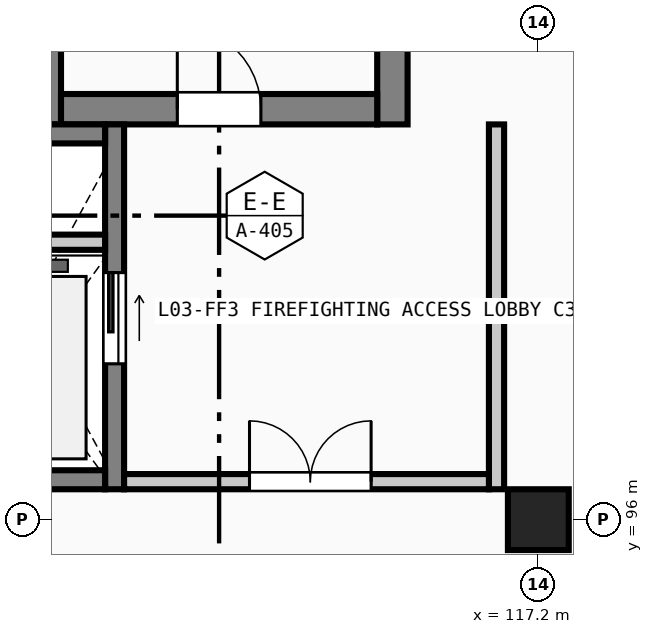
"""IFC4 building model, lengths in metres.
Left out: names, types, materials, properties, quantities, classifications, styles, units other than length and angle.
Written with IfcOpenShell. Run it as: python <this file> out.ifc"""

import sys

from ifc_helpers import new_model, si_unit, direction, frame, frame_2d, origin, origin_2d, place, context, subcontext, project, spatial, rectangle, extrude, element, fill, save


model = new_model("IFC4")
c1 = context("Model", 3, precision=1e-05, world=origin(), true_north=direction((0.0, 1.0)))
c2 = subcontext(c1, "Body", "Model", "MODEL_VIEW")
j1 = project(units=[si_unit("LENGTHUNIT", "METRE"), si_unit("PLANEANGLEUNIT", "RADIAN")], contexts=[c1])
p1 = place(None, origin())
s1 = spatial("IfcSite", under=j1, at=p1, CompositionType="ELEMENT")
p2 = place(p1, origin())
s2 = spatial("IfcBuilding", under=s1, at=p2, CompositionType="ELEMENT")
p3 = place(p2, frame((0.0, 0.0, 14.4)))
s3 = spatial("IfcBuildingStorey", under=s2, at=p3, CompositionType="ELEMENT", Elevation=14.4)
p4 = place(p3, frame((117.2, 96.0, 0.0), z_axis=(0.0, 0.0, 1.0), x_axis=(1.0, 0.0, 0.0)))
e1 = element("IfcColumn", 1, at=p4, inside=s3, PredefinedType="COLUMN", context=c2, shape_type="SweptSolid", body=[
    extrude(rectangle(XDim=0.8, YDim=0.8, at=origin_2d()), origin(), (0.0, 0.0, 1.0), 4.48),
])
for number, where, z_axis, x_axis in (
    (2, (110.72, 101.2, 0.0), (0.0, 0.0, 1.0), (0.0, 1.0, 0.0)),
    (3, (115.28, 110.4, 0.0), (0.0, 0.0, 1.0), (0.0, -1.0, 0.0)),
):
    element("IfcWall", number, at=place(p3, frame(where, z_axis=z_axis, x_axis=x_axis)), inside=s3, PredefinedType="SHEAR", context=c2, shape_type="SweptSolid", body=[
        extrude(rectangle(XDim=9.2, YDim=0.4, at=frame_2d((4.6, 0.0))), origin(), (0.0, 0.0, 1.0), 4.18),
    ])
p5 = place(p3, frame((115.08, 101.4, 0.0), z_axis=(0.0, 0.0, 1.0), x_axis=(-1.0, 0.0, 0.0)))
e4 = element("IfcWall", 4, at=p5, inside=s3, PredefinedType="SHEAR", context=c2, shape_type="SweptSolid", body=[
    extrude(rectangle(XDim=4.16, YDim=0.4, at=frame_2d((2.08, 0.0))), origin(), (0.0, 0.0, 1.0), 4.18),
])
p6 = place(p5, frame((1.53, 0.0, 0.0)))
e5 = element("IfcOpeningElement", 5, at=p6, cuts=e4, PredefinedType="OPENING", context=c2, shape_type="SweptSolid", body=[
    extrude(rectangle(XDim=1.1, YDim=2.2, at=frame_2d((0.55, 1.1))), frame((0.0, 0.21, 0.0), z_axis=(0.0, -1.0, 0.0), x_axis=(1.0, 0.0, 0.0)), (0.0, 0.0, 1.0), 0.42),
])
p7 = place(p3, frame((111.625, 101.2, 0.0), z_axis=(0.0, 0.0, 1.0), x_axis=(0.0, -1.0, 0.0)))
e6 = element("IfcWall", 6, at=p7, inside=s3, PredefinedType="SOLIDWALL", context=c2, shape_type="SweptSolid", body=[
    extrude(rectangle(XDim=4.8, YDim=0.25, at=frame_2d((2.4, 0.0))), origin(), (0.0, 0.0, 1.0), 4.18),
])
p8 = place(p7, frame((1.95, 0.0, 0.0)))
e7 = element("IfcOpeningElement", 7, at=p8, cuts=e6, PredefinedType="OPENING", context=c2, shape_type="SweptSolid", body=[
    extrude(rectangle(XDim=1.2, YDim=2.2, at=frame_2d((0.6, 1.1))), frame((0.0, 0.135, 0.0), z_axis=(0.0, -1.0, 0.0), x_axis=(1.0, 0.0, 0.0)), (0.0, 0.0, 1.0), 0.27),
])
for number, where, z_axis, x_axis in (
    (8, (111.5, 96.525, 0.0), (0.0, 0.0, 1.0), (-1.0, 0.0, 0.0)),
    (9, (109.4, 101.075, 0.0), (0.0, 0.0, 1.0), (1.0, 0.0, 0.0)),
):
    element("IfcWall", number, at=place(p3, frame(where, z_axis=z_axis, x_axis=x_axis)), inside=s3, PredefinedType="SOLIDWALL", context=c2, shape_type="SweptSolid", body=[
        extrude(rectangle(XDim=2.1, YDim=0.25, at=frame_2d((1.05, 0.0))), origin(), (0.0, 0.0, 1.0), 4.18),
    ])
p9 = place(p3, frame((109.4, 99.65, 0.0), z_axis=(0.0, 0.0, 1.0), x_axis=(1.0, 0.0, 0.0)))
e10 = element("IfcWall", 10, at=p9, inside=s3, PredefinedType="SOLIDWALL", context=c2, shape_type="SweptSolid", body=[
    extrude(rectangle(XDim=2.1, YDim=0.2, at=frame_2d((1.05, 0.0))), origin(), (0.0, 0.0, 1.0), 4.18),
])
p10 = place(p3, frame((116.65, 101.2, 0.0), z_axis=(0.0, 0.0, 1.0), x_axis=(0.0, -1.0, 0.0)))
e11 = element("IfcWall", 11, at=p10, inside=s3, PredefinedType="SOLIDWALL", context=c2, shape_type="SweptSolid", body=[
    extrude(rectangle(XDim=4.8, YDim=0.2, at=frame_2d((2.4, 0.0))), origin(), (0.0, 0.0, 1.0), 4.18),
])
p11 = place(p3, frame((116.55, 96.5, 0.0), z_axis=(0.0, 0.0, 1.0), x_axis=(-1.0, 0.0, 0.0)))
e12 = element("IfcWall", 12, at=p11, inside=s3, PredefinedType="SOLIDWALL", context=c2, shape_type="SweptSolid", body=[
    extrude(rectangle(XDim=4.8, YDim=0.2, at=frame_2d((2.4, 0.0))), origin(), (0.0, 0.0, 1.0), 4.18),
])
p12 = place(p11, frame((1.55, 0.0, 0.0)))
e13 = element("IfcOpeningElement", 13, at=p12, cuts=e12, PredefinedType="OPENING", context=c2, shape_type="SweptSolid", body=[
    extrude(rectangle(XDim=1.6, YDim=2.2, at=frame_2d((0.8, 1.1))), frame((0.0, 0.11, 0.0), z_axis=(0.0, -1.0, 0.0), x_axis=(1.0, 0.0, 0.0)), (0.0, 0.0, 1.0), 0.22),
])
p13 = place(p6, frame((1.1, 0.0, 0.0), z_axis=(0.0, 0.0, 1.0), x_axis=(-1.0, 0.0, 0.0)))
e14 = element("IfcDoor", 14, at=p13, inside=s3, OperationType="SINGLE_SWING_LEFT", PredefinedType="DOOR", context=c2, shape_type="SweptSolid", body=[
    extrude(rectangle(XDim=1.1, YDim=2.2, at=frame_2d((0.55, 1.1))), frame((0.0, 0.025, 0.0), z_axis=(0.0, -1.0, 0.0), x_axis=(1.0, 0.0, 0.0)), (0.0, 0.0, 1.0), 0.05),
])
fill(e5, e14)
p14 = place(p8, origin())
e15 = element("IfcDoor", 15, at=p14, inside=s3, OperationType="SLIDING_TO_LEFT", PredefinedType="DOOR", context=c2, shape_type="SweptSolid", body=[
    extrude(rectangle(XDim=1.2, YDim=2.2, at=frame_2d((0.6, 1.1))), frame((0.0, 0.025, 0.0), z_axis=(0.0, -1.0, 0.0), x_axis=(1.0, 0.0, 0.0)), (0.0, 0.0, 1.0), 0.05),
])
fill(e7, e15)
p15 = place(p12, frame((1.6, 0.0, 0.0), z_axis=(0.0, 0.0, 1.0), x_axis=(-1.0, 0.0, 0.0)))
e16 = element("IfcDoor", 16, at=p15, inside=s3, OperationType="DOUBLE_DOOR_SINGLE_SWING", PredefinedType="DOOR", context=c2, shape_type="SweptSolid", body=[
    extrude(rectangle(XDim=1.6, YDim=2.2, at=frame_2d((0.8, 1.1))), frame((0.0, 0.025, 0.0), z_axis=(0.0, -1.0, 0.0), x_axis=(1.0, 0.0, 0.0)), (0.0, 0.0, 1.0), 0.05),
])
fill(e13, e16)
save(model, sys.argv[1])
